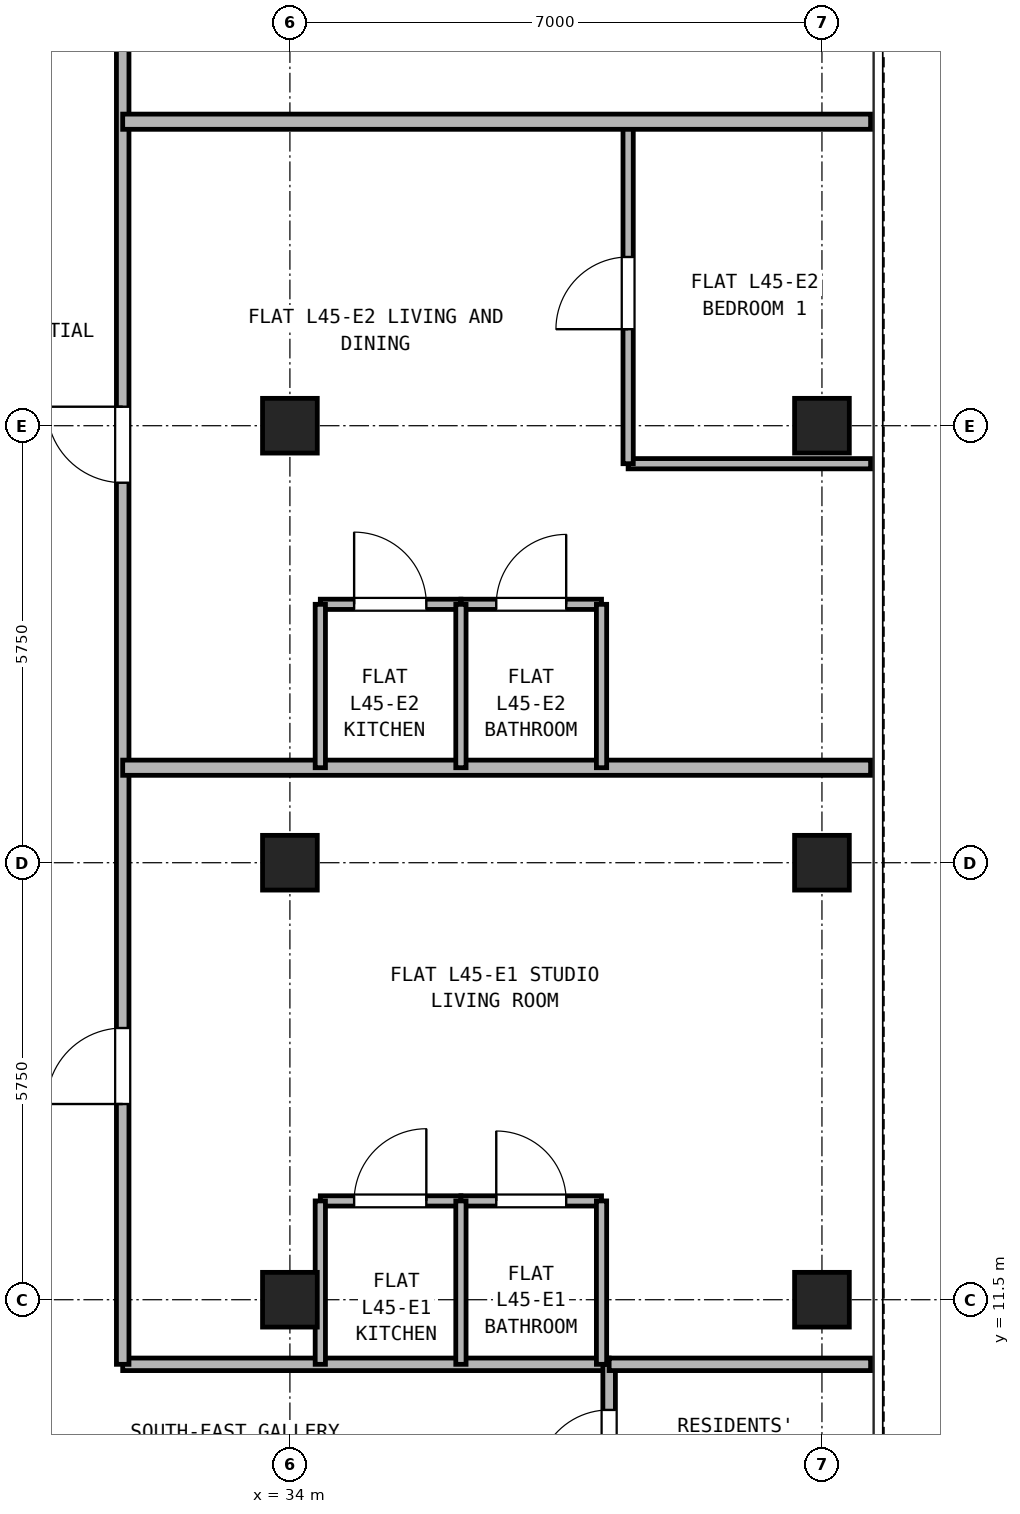
"""IFC4 building model, lengths in metres.
Left out: names, types, materials, properties, quantities, classifications, styles, units other than length and angle.
Written with IfcOpenShell. Run it as: python <this file> out.ifc"""

import sys

from ifc_helpers import new_model, si_unit, direction, frame, frame_2d, origin, origin_2d, place, context, subcontext, project, spatial, rectangle, hollow_rectangle, extrude, source, transform, mapped, element, fill, save


model = new_model("IFC4")
c1 = context("Model", 3, precision=1e-05, world=origin(), true_north=direction((0.0, 1.0)))
c2 = subcontext(c1, "Body", "Model", "MODEL_VIEW")
j1 = project(units=[si_unit("LENGTHUNIT", "METRE"), si_unit("PLANEANGLEUNIT", "RADIAN")], contexts=[c1])
p1 = place(None, origin())
s1 = spatial("IfcSite", under=j1, at=p1, CompositionType="ELEMENT")
p2 = place(p1, origin())
s2 = spatial("IfcBuilding", under=s1, at=p2, CompositionType="ELEMENT")
p3 = place(p2, frame((0.0, 0.0, 162.5)))
s3 = spatial("IfcBuildingStorey", under=s2, at=p3, CompositionType="ELEMENT", Elevation=162.5)
m1 = source(origin(), c2, "Body", "SweptSolid", [
    extrude(hollow_rectangle(XDim=0.72, YDim=0.72, WallThickness=0.04, at=origin_2d()), origin(), (0.0, 0.0, 1.0), 2.95),
])
for number, where, z_axis, x_axis in (
    (1, (41.0, 11.5, 0.0), (0.0, 0.0, 1.0), (1.0, 0.0, 0.0)),
    (2, (41.0, 17.25, 0.0), (0.0, 0.0, 1.0), (1.0, 0.0, 0.0)),
    (3, (41.0, 23.0, 0.0), (0.0, 0.0, 1.0), (1.0, 0.0, 0.0)),
    (4, (34.0, 11.5, 0.0), (0.0, 0.0, 1.0), (1.0, 0.0, 0.0)),
    (5, (34.0, 17.25, 0.0), (0.0, 0.0, 1.0), (1.0, 0.0, 0.0)),
    (6, (34.0, 23.0, 0.0), (0.0, 0.0, 1.0), (1.0, 0.0, 0.0)),
):
    element("IfcColumn", number, at=place(p3, frame(where, z_axis=z_axis, x_axis=x_axis)), inside=s3, PredefinedType="COLUMN", context=c2, shape_type="MappedRepresentation", body=[
        mapped(m1, transform((0.0, 0.0, 0.0), x_axis=(1.0, 0.0, 0.0), y_axis=(0.0, 1.0, 0.0), z_axis=(0.0, 0.0, 1.0), scale=1.0)),
    ])
p4 = place(p3, frame((31.8, 10.65, 0.0), z_axis=(0.0, 0.0, 1.0), x_axis=(1.0, 0.0, 0.0)))
e7 = element("IfcWall", 7, at=p4, inside=s3, PredefinedType="PARTITIONING", context=c2, shape_type="SweptSolid", body=[
    extrude(rectangle(XDim=6.4, YDim=0.165, at=frame_2d((3.2, 0.0))), origin(), (0.0, 0.0, 1.0), 2.95),
])
p5 = place(p3, frame((38.2, 8.65, 0.0), z_axis=(0.0, 0.0, 1.0), x_axis=(0.0, 1.0, 0.0)))
e8 = element("IfcWall", 8, at=p5, inside=s3, PredefinedType="PARTITIONING", context=c2, shape_type="SweptSolid", body=[
    extrude(rectangle(XDim=2.0, YDim=0.165, at=frame_2d((1.0, 0.0))), origin(), (0.0, 0.0, 1.0), 2.95),
])
p6 = place(p5, frame((0.45, 0.0, 0.0)))
e9 = element("IfcOpeningElement", 9, at=p6, cuts=e8, PredefinedType="OPENING", context=c2, shape_type="SweptSolid", body=[
    extrude(rectangle(XDim=0.95, YDim=2.15, at=frame_2d((0.475, 1.075))), frame((0.0, 0.093, 0.0), z_axis=(0.0, -1.0, 0.0), x_axis=(1.0, 0.0, 0.0)), (0.0, 0.0, 1.0), 0.185),
])
p7 = place(p3, frame((31.8, 10.65, 0.0), z_axis=(0.0, 0.0, 1.0), x_axis=(0.0, 1.0, 0.0)))
e10 = element("IfcWall", 10, at=p7, inside=s3, PredefinedType="PARTITIONING", context=c2, shape_type="SweptSolid", body=[
    extrude(rectangle(XDim=24.49, YDim=0.165, at=frame_2d((12.245, 0.0))), origin(), (0.0, 0.0, 1.0), 2.95),
])
p8 = place(p7, frame((3.425, 0.0, 0.0)))
e11 = element("IfcOpeningElement", 11, at=p8, cuts=e10, PredefinedType="OPENING", context=c2, shape_type="SweptSolid", body=[
    extrude(rectangle(XDim=1.0, YDim=2.15, at=frame_2d((0.5, 1.075))), frame((0.0, 0.093, 0.0), z_axis=(0.0, -1.0, 0.0), x_axis=(1.0, 0.0, 0.0)), (0.0, 0.0, 1.0), 0.185),
])
p9 = place(p7, frame((11.6, 0.0, 0.0)))
e12 = element("IfcOpeningElement", 12, at=p9, cuts=e10, PredefinedType="OPENING", context=c2, shape_type="SweptSolid", body=[
    extrude(rectangle(XDim=1.0, YDim=2.15, at=frame_2d((0.5, 1.075))), frame((0.0, 0.093, 0.0), z_axis=(0.0, -1.0, 0.0), x_axis=(1.0, 0.0, 0.0)), (0.0, 0.0, 1.0), 0.185),
])
p10 = place(p7, frame((18.25, 0.0, 0.0)))
e13 = element("IfcOpeningElement", 13, at=p10, cuts=e10, PredefinedType="OPENING", context=c2, shape_type="SweptSolid", body=[
    extrude(rectangle(XDim=1.0, YDim=2.15, at=frame_2d((0.5, 1.075))), frame((0.0, 0.093, 0.0), z_axis=(0.0, -1.0, 0.0), x_axis=(1.0, 0.0, 0.0)), (0.0, 0.0, 1.0), 0.185),
])
p11 = place(p3, frame((38.2, 10.65, 0.0), z_axis=(0.0, 0.0, 1.0), x_axis=(1.0, 0.0, 0.0)))
e14 = element("IfcWall", 14, at=p11, inside=s3, PredefinedType="PARTITIONING", context=c2, shape_type="SweptSolid", body=[
    extrude(rectangle(XDim=3.44, YDim=0.165, at=frame_2d((1.72, 0.0))), origin(), (0.0, 0.0, 1.0), 2.95),
])
p12 = place(p3, frame((34.4, 12.8, 0.0), z_axis=(0.0, 0.0, 1.0), x_axis=(1.0, 0.0, 0.0)))
e15 = element("IfcWall", 15, at=p12, inside=s3, PredefinedType="PARTITIONING", context=c2, shape_type="SweptSolid", body=[
    extrude(rectangle(XDim=1.85, YDim=0.135, at=frame_2d((0.925, 0.0))), origin(), (0.0, 0.0, 1.0), 2.95),
])
p13 = place(p12, frame((0.445, 0.0, 0.0)))
e16 = element("IfcOpeningElement", 16, at=p13, cuts=e15, PredefinedType="OPENING", context=c2, shape_type="SweptSolid", body=[
    extrude(rectangle(XDim=0.95, YDim=2.15, at=frame_2d((0.475, 1.075))), frame((0.0, 0.077, 0.0), z_axis=(0.0, -1.0, 0.0), x_axis=(1.0, 0.0, 0.0)), (0.0, 0.0, 1.0), 0.155),
])
p14 = place(p3, frame((36.25, 12.8, 0.0), z_axis=(0.0, 0.0, 1.0), x_axis=(1.0, 0.0, 0.0)))
e17 = element("IfcWall", 17, at=p14, inside=s3, PredefinedType="PARTITIONING", context=c2, shape_type="SweptSolid", body=[
    extrude(rectangle(XDim=1.85, YDim=0.135, at=frame_2d((0.925, 0.0))), origin(), (0.0, 0.0, 1.0), 2.95),
])
p15 = place(p14, frame((0.465, 0.0, 0.0)))
e18 = element("IfcOpeningElement", 18, at=p15, cuts=e17, PredefinedType="OPENING", context=c2, shape_type="SweptSolid", body=[
    extrude(rectangle(XDim=0.92, YDim=2.1, at=frame_2d((0.46, 1.05))), frame((0.0, 0.077, 0.0), z_axis=(0.0, -1.0, 0.0), x_axis=(1.0, 0.0, 0.0)), (0.0, 0.0, 1.0), 0.155),
])
for number, where, z_axis, x_axis in (
    (19, (34.4, 10.65, 0.0), (0.0, 0.0, 1.0), (0.0, 1.0, 0.0)),
    (20, (36.25, 10.65, 0.0), (0.0, 0.0, 1.0), (0.0, 1.0, 0.0)),
    (21, (38.1, 10.65, 0.0), (0.0, 0.0, 1.0), (0.0, 1.0, 0.0)),
):
    element("IfcWall", number, at=place(p3, frame(where, z_axis=z_axis, x_axis=x_axis)), inside=s3, PredefinedType="PARTITIONING", context=c2, shape_type="SweptSolid", body=[
        extrude(rectangle(XDim=2.15, YDim=0.135, at=frame_2d((1.075, 0.0))), origin(), (0.0, 0.0, 1.0), 2.95),
    ])
p16 = place(p3, frame((31.8, 18.5, 0.0), z_axis=(0.0, 0.0, 1.0), x_axis=(1.0, 0.0, 0.0)))
e22 = element("IfcWall", 22, at=p16, inside=s3, PredefinedType="PARTITIONING", context=c2, shape_type="SweptSolid", body=[
    extrude(rectangle(XDim=9.84, YDim=0.2, at=frame_2d((4.92, 0.0))), origin(), (0.0, 0.0, 1.0), 2.95),
])
p17 = place(p3, frame((34.4, 20.65, 0.0), z_axis=(0.0, 0.0, 1.0), x_axis=(1.0, 0.0, 0.0)))
e23 = element("IfcWall", 23, at=p17, inside=s3, PredefinedType="PARTITIONING", context=c2, shape_type="SweptSolid", body=[
    extrude(rectangle(XDim=1.85, YDim=0.135, at=frame_2d((0.925, 0.0))), origin(), (0.0, 0.0, 1.0), 2.95),
])
p18 = place(p17, frame((0.445, 0.0, 0.0)))
e24 = element("IfcOpeningElement", 24, at=p18, cuts=e23, PredefinedType="OPENING", context=c2, shape_type="SweptSolid", body=[
    extrude(rectangle(XDim=0.95, YDim=2.15, at=frame_2d((0.475, 1.075))), frame((0.0, 0.077, 0.0), z_axis=(0.0, -1.0, 0.0), x_axis=(1.0, 0.0, 0.0)), (0.0, 0.0, 1.0), 0.155),
])
p19 = place(p3, frame((36.25, 20.65, 0.0), z_axis=(0.0, 0.0, 1.0), x_axis=(1.0, 0.0, 0.0)))
e25 = element("IfcWall", 25, at=p19, inside=s3, PredefinedType="PARTITIONING", context=c2, shape_type="SweptSolid", body=[
    extrude(rectangle(XDim=1.85, YDim=0.135, at=frame_2d((0.925, 0.0))), origin(), (0.0, 0.0, 1.0), 2.95),
])
p20 = place(p19, frame((0.465, 0.0, 0.0)))
e26 = element("IfcOpeningElement", 26, at=p20, cuts=e25, PredefinedType="OPENING", context=c2, shape_type="SweptSolid", body=[
    extrude(rectangle(XDim=0.92, YDim=2.1, at=frame_2d((0.46, 1.05))), frame((0.0, 0.077, 0.0), z_axis=(0.0, -1.0, 0.0), x_axis=(1.0, 0.0, 0.0)), (0.0, 0.0, 1.0), 0.155),
])
for number, where, z_axis, x_axis in (
    (27, (34.4, 18.5, 0.0), (0.0, 0.0, 1.0), (0.0, 1.0, 0.0)),
    (28, (36.25, 18.5, 0.0), (0.0, 0.0, 1.0), (0.0, 1.0, 0.0)),
    (29, (38.1, 18.5, 0.0), (0.0, 0.0, 1.0), (0.0, 1.0, 0.0)),
):
    element("IfcWall", number, at=place(p3, frame(where, z_axis=z_axis, x_axis=x_axis)), inside=s3, PredefinedType="PARTITIONING", context=c2, shape_type="SweptSolid", body=[
        extrude(rectangle(XDim=2.15, YDim=0.135, at=frame_2d((1.075, 0.0))), origin(), (0.0, 0.0, 1.0), 2.95),
    ])
p21 = place(p3, frame((38.45, 22.5, 0.0), z_axis=(0.0, 0.0, 1.0), x_axis=(1.0, 0.0, 0.0)))
e30 = element("IfcWall", 30, at=p21, inside=s3, PredefinedType="PARTITIONING", context=c2, shape_type="SweptSolid", body=[
    extrude(rectangle(XDim=3.19, YDim=0.135, at=frame_2d((1.595, 0.0))), origin(), (0.0, 0.0, 1.0), 2.95),
])
p22 = place(p3, frame((38.45, 22.5, 0.0), z_axis=(0.0, 0.0, 1.0), x_axis=(0.0, 1.0, 0.0)))
e31 = element("IfcWall", 31, at=p22, inside=s3, PredefinedType="PARTITIONING", context=c2, shape_type="SweptSolid", body=[
    extrude(rectangle(XDim=4.5, YDim=0.135, at=frame_2d((2.25, 0.0))), origin(), (0.0, 0.0, 1.0), 2.95),
])
p23 = place(p22, frame((1.77, 0.0, 0.0)))
e32 = element("IfcOpeningElement", 32, at=p23, cuts=e31, PredefinedType="OPENING", context=c2, shape_type="SweptSolid", body=[
    extrude(rectangle(XDim=0.95, YDim=2.15, at=frame_2d((0.475, 1.075))), frame((0.0, 0.077, 0.0), z_axis=(0.0, -1.0, 0.0), x_axis=(1.0, 0.0, 0.0)), (0.0, 0.0, 1.0), 0.155),
])
p24 = place(p3, frame((31.8, 27.0, 0.0), z_axis=(0.0, 0.0, 1.0), x_axis=(1.0, 0.0, 0.0)))
e33 = element("IfcWall", 33, at=p24, inside=s3, PredefinedType="PARTITIONING", context=c2, shape_type="SweptSolid", body=[
    extrude(rectangle(XDim=9.84, YDim=0.2, at=frame_2d((4.92, 0.0))), origin(), (0.0, 0.0, 1.0), 2.95),
])
p25 = place(p6, origin())
e34 = element("IfcDoor", 34, at=p25, inside=s3, OperationType="SINGLE_SWING_LEFT", PredefinedType="DOOR", context=c2, shape_type="SweptSolid", body=[
    extrude(rectangle(XDim=0.95, YDim=2.15, at=frame_2d((0.475, 1.075))), frame((0.0, 0.025, 0.0), z_axis=(0.0, -1.0, 0.0), x_axis=(1.0, 0.0, 0.0)), (0.0, 0.0, 1.0), 0.05),
])
fill(e9, e34)
p26 = place(p13, origin())
e35 = element("IfcDoor", 35, at=p26, inside=s3, OperationType="SINGLE_SWING_RIGHT", PredefinedType="DOOR", context=c2, shape_type="SweptSolid", body=[
    extrude(rectangle(XDim=0.95, YDim=2.15, at=frame_2d((0.475, 1.075))), frame((0.0, 0.025, 0.0), z_axis=(0.0, -1.0, 0.0), x_axis=(1.0, 0.0, 0.0)), (0.0, 0.0, 1.0), 0.05),
])
fill(e16, e35)
p27 = place(p15, origin())
e36 = element("IfcDoor", 36, at=p27, inside=s3, OperationType="SINGLE_SWING_LEFT", PredefinedType="DOOR", context=c2, shape_type="SweptSolid", body=[
    extrude(rectangle(XDim=0.92, YDim=2.1, at=frame_2d((0.46, 1.05))), frame((0.0, 0.025, 0.0), z_axis=(0.0, -1.0, 0.0), x_axis=(1.0, 0.0, 0.0)), (0.0, 0.0, 1.0), 0.05),
])
fill(e18, e36)
p28 = place(p8, frame((1.0, 0.0, 0.0), z_axis=(0.0, 0.0, 1.0), x_axis=(-1.0, 0.0, 0.0)))
e37 = element("IfcDoor", 37, at=p28, inside=s3, OperationType="SINGLE_SWING_LEFT", PredefinedType="DOOR", context=c2, shape_type="SweptSolid", body=[
    extrude(rectangle(XDim=1.0, YDim=2.15, at=frame_2d((0.5, 1.075))), frame((0.0, 0.025, 0.0), z_axis=(0.0, -1.0, 0.0), x_axis=(1.0, 0.0, 0.0)), (0.0, 0.0, 1.0), 0.05),
])
fill(e11, e37)
p29 = place(p18, origin())
e38 = element("IfcDoor", 38, at=p29, inside=s3, OperationType="SINGLE_SWING_LEFT", PredefinedType="DOOR", context=c2, shape_type="SweptSolid", body=[
    extrude(rectangle(XDim=0.95, YDim=2.15, at=frame_2d((0.475, 1.075))), frame((0.0, 0.025, 0.0), z_axis=(0.0, -1.0, 0.0), x_axis=(1.0, 0.0, 0.0)), (0.0, 0.0, 1.0), 0.05),
])
fill(e24, e38)
p30 = place(p20, origin())
e39 = element("IfcDoor", 39, at=p30, inside=s3, OperationType="SINGLE_SWING_RIGHT", PredefinedType="DOOR", context=c2, shape_type="SweptSolid", body=[
    extrude(rectangle(XDim=0.92, YDim=2.1, at=frame_2d((0.46, 1.05))), frame((0.0, 0.025, 0.0), z_axis=(0.0, -1.0, 0.0), x_axis=(1.0, 0.0, 0.0)), (0.0, 0.0, 1.0), 0.05),
])
fill(e26, e39)
p31 = place(p23, frame((0.95, 0.0, 0.0), z_axis=(0.0, 0.0, 1.0), x_axis=(-1.0, 0.0, 0.0)))
e40 = element("IfcDoor", 40, at=p31, inside=s3, OperationType="SINGLE_SWING_LEFT", PredefinedType="DOOR", context=c2, shape_type="SweptSolid", body=[
    extrude(rectangle(XDim=0.95, YDim=2.15, at=frame_2d((0.475, 1.075))), frame((0.0, 0.025, 0.0), z_axis=(0.0, -1.0, 0.0), x_axis=(1.0, 0.0, 0.0)), (0.0, 0.0, 1.0), 0.05),
])
fill(e32, e40)
p32 = place(p9, frame((1.0, 0.0, 0.0), z_axis=(0.0, 0.0, 1.0), x_axis=(-1.0, 0.0, 0.0)))
e41 = element("IfcDoor", 41, at=p32, inside=s3, OperationType="SINGLE_SWING_RIGHT", PredefinedType="DOOR", context=c2, shape_type="SweptSolid", body=[
    extrude(rectangle(XDim=1.0, YDim=2.15, at=frame_2d((0.5, 1.075))), frame((0.0, 0.025, 0.0), z_axis=(0.0, -1.0, 0.0), x_axis=(1.0, 0.0, 0.0)), (0.0, 0.0, 1.0), 0.05),
])
fill(e12, e41)
save(model, sys.argv[1])
